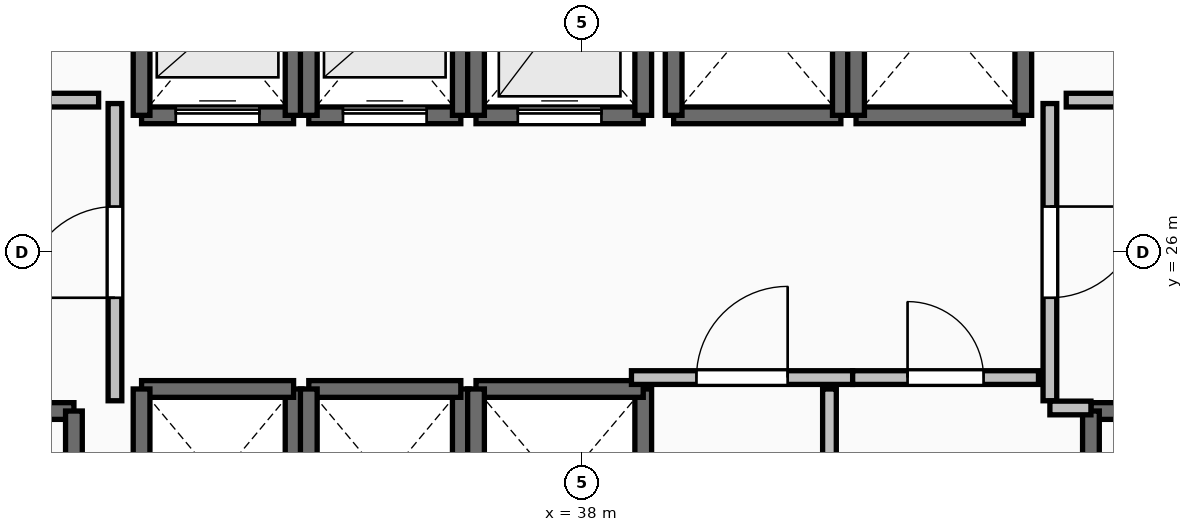
"""IFC4 building model, lengths in metres.
Left out: names, types, materials, properties, quantities, classifications, styles, units other than length and angle.
Written with IfcOpenShell. Run it as: python <this file> out.ifc"""

import sys

from ifc_helpers import new_model, si_unit, direction, frame, frame_2d, origin, place, context, subcontext, project, spatial, rectangle, extrude, element, fill, save


model = new_model("IFC4")
c1 = context("Model", 3, precision=1e-05, world=origin(), true_north=direction((0.0, 1.0)))
c2 = subcontext(c1, "Body", "Model", "MODEL_VIEW")
j1 = project(units=[si_unit("LENGTHUNIT", "METRE"), si_unit("PLANEANGLEUNIT", "RADIAN")], contexts=[c1])
p1 = place(None, origin())
s1 = spatial("IfcSite", under=j1, at=p1, CompositionType="ELEMENT")
p2 = place(p1, origin())
s2 = spatial("IfcBuilding", under=s1, at=p2, CompositionType="ELEMENT")
p3 = place(p2, frame((0.0, 0.0, 74.3)))
s3 = spatial("IfcBuildingStorey", under=s2, at=p3, CompositionType="ELEMENT", Elevation=74.3)
p4 = place(p3, frame((27.94, 23.91, 0.0), z_axis=(0.0, 0.0, 1.0), x_axis=(1.0, 0.0, 0.0)))
e1 = element("IfcWall", 1, at=p4, inside=s3, PredefinedType="SOLIDWALL", context=c2, shape_type="SweptSolid", body=[
    extrude(rectangle(XDim=3.37, YDim=0.22, at=frame_2d((1.685, 0.0))), origin(), (0.0, 0.0, 1.0), 4.24),
])
p5 = place(p4, frame((1.135, 0.0, 0.0)))
e2 = element("IfcOpeningElement", 2, at=p5, cuts=e1, PredefinedType="OPENING", context=c2, shape_type="SweptSolid", body=[
    extrude(rectangle(XDim=1.1, YDim=2.15, at=frame_2d((0.55, 1.075))), frame((0.0, 0.125, 0.0), z_axis=(0.0, -1.0, 0.0), x_axis=(1.0, 0.0, 0.0)), (0.0, 0.0, 1.0), 0.25),
])
p6 = place(p3, frame((31.31, 23.91, 0.0), z_axis=(0.0, 0.0, 1.0), x_axis=(0.0, -1.0, 0.0)))
e3 = element("IfcWall", 3, at=p6, inside=s3, PredefinedType="SOLIDWALL", context=c2, shape_type="SweptSolid", body=[
    extrude(rectangle(XDim=7.42, YDim=0.22, at=frame_2d((3.71, 0.0))), origin(), (0.0, 0.0, 1.0), 4.24),
])
p7 = place(p3, frame((44.69, 23.91, 0.0), z_axis=(0.0, 0.0, 1.0), x_axis=(1.0, 0.0, 0.0)))
e4 = element("IfcWall", 4, at=p7, inside=s3, PredefinedType="SOLIDWALL", context=c2, shape_type="SweptSolid", body=[
    extrude(rectangle(XDim=3.37, YDim=0.22, at=frame_2d((1.685, 0.0))), origin(), (0.0, 0.0, 1.0), 4.24),
])
p8 = place(p7, frame((1.135, 0.0, 0.0)))
e5 = element("IfcOpeningElement", 5, at=p8, cuts=e4, PredefinedType="OPENING", context=c2, shape_type="SweptSolid", body=[
    extrude(rectangle(XDim=1.1, YDim=2.15, at=frame_2d((0.55, 1.075))), frame((0.0, 0.125, 0.0), z_axis=(0.0, -1.0, 0.0), x_axis=(1.0, 0.0, 0.0)), (0.0, 0.0, 1.0), 0.25),
])
p9 = place(p3, frame((44.69, 16.49, 0.0), z_axis=(0.0, 0.0, 1.0), x_axis=(0.0, 1.0, 0.0)))
e6 = element("IfcWall", 6, at=p9, inside=s3, PredefinedType="SOLIDWALL", context=c2, shape_type="SweptSolid", body=[
    extrude(rectangle(XDim=7.42, YDim=0.22, at=frame_2d((3.71, 0.0))), origin(), (0.0, 0.0, 1.0), 4.24),
])
p10 = place(p3, frame((32.2, 27.8, 0.0), z_axis=(0.0, 0.0, 1.0), x_axis=(1.0, 0.0, 0.0)))
e7 = element("IfcWall", 7, at=p10, inside=s3, PredefinedType="SOLIDWALL", context=c2, shape_type="SweptSolid", body=[
    extrude(rectangle(XDim=2.0, YDim=0.22, at=frame_2d((1.0, 0.0))), origin(), (0.0, 0.0, 1.0), 4.24),
])
p11 = place(p10, frame((0.45, 0.0, 0.0)))
e8 = element("IfcOpeningElement", 8, at=p11, cuts=e7, PredefinedType="OPENING", context=c2, shape_type="SweptSolid", body=[
    extrude(rectangle(XDim=1.1, YDim=2.2, at=frame_2d((0.55, 1.1))), frame((0.0, 0.125, 0.0), z_axis=(0.0, -1.0, 0.0), x_axis=(1.0, 0.0, 0.0)), (0.0, 0.0, 1.0), 0.25),
])
for number, where, z_axis, x_axis in (
    (9, (34.2, 27.8, 0.0), (0.0, 0.0, 1.0), (0.0, 1.0, 0.0)),
    (10, (32.2, 30.2, 0.0), (0.0, 0.0, 1.0), (0.0, -1.0, 0.0)),
):
    element("IfcWall", number, at=place(p3, frame(where, z_axis=z_axis, x_axis=x_axis)), inside=s3, PredefinedType="SOLIDWALL", context=c2, shape_type="SweptSolid", body=[
        extrude(rectangle(XDim=2.4, YDim=0.22, at=frame_2d((1.2, 0.0))), origin(), (0.0, 0.0, 1.0), 4.24),
    ])
p12 = place(p3, frame((34.4, 27.8, 0.0), z_axis=(0.0, 0.0, 1.0), x_axis=(1.0, 0.0, 0.0)))
e11 = element("IfcWall", 11, at=p12, inside=s3, PredefinedType="SOLIDWALL", context=c2, shape_type="SweptSolid", body=[
    extrude(rectangle(XDim=2.0, YDim=0.22, at=frame_2d((1.0, 0.0))), origin(), (0.0, 0.0, 1.0), 4.24),
])
p13 = place(p12, frame((0.45, 0.0, 0.0)))
e12 = element("IfcOpeningElement", 12, at=p13, cuts=e11, PredefinedType="OPENING", context=c2, shape_type="SweptSolid", body=[
    extrude(rectangle(XDim=1.1, YDim=2.2, at=frame_2d((0.55, 1.1))), frame((0.0, 0.125, 0.0), z_axis=(0.0, -1.0, 0.0), x_axis=(1.0, 0.0, 0.0)), (0.0, 0.0, 1.0), 0.25),
])
for number, where, z_axis, x_axis in (
    (13, (36.4, 27.8, 0.0), (0.0, 0.0, 1.0), (0.0, 1.0, 0.0)),
    (14, (34.4, 30.2, 0.0), (0.0, 0.0, 1.0), (0.0, -1.0, 0.0)),
):
    element("IfcWall", number, at=place(p3, frame(where, z_axis=z_axis, x_axis=x_axis)), inside=s3, PredefinedType="SOLIDWALL", context=c2, shape_type="SweptSolid", body=[
        extrude(rectangle(XDim=2.4, YDim=0.22, at=frame_2d((1.2, 0.0))), origin(), (0.0, 0.0, 1.0), 4.24),
    ])
p14 = place(p3, frame((36.6, 27.8, 0.0), z_axis=(0.0, 0.0, 1.0), x_axis=(1.0, 0.0, 0.0)))
e15 = element("IfcWall", 15, at=p14, inside=s3, PredefinedType="SOLIDWALL", context=c2, shape_type="SweptSolid", body=[
    extrude(rectangle(XDim=2.2, YDim=0.22, at=frame_2d((1.1, 0.0))), origin(), (0.0, 0.0, 1.0), 4.24),
])
p15 = place(p14, frame((0.55, 0.0, 0.0)))
e16 = element("IfcOpeningElement", 16, at=p15, cuts=e15, PredefinedType="OPENING", context=c2, shape_type="SweptSolid", body=[
    extrude(rectangle(XDim=1.1, YDim=2.2, at=frame_2d((0.55, 1.1))), frame((0.0, 0.125, 0.0), z_axis=(0.0, -1.0, 0.0), x_axis=(1.0, 0.0, 0.0)), (0.0, 0.0, 1.0), 0.25),
])
for number, where, z_axis, x_axis in (
    (17, (38.8, 27.8, 0.0), (0.0, 0.0, 1.0), (0.0, 1.0, 0.0)),
    (18, (36.6, 30.4, 0.0), (0.0, 0.0, 1.0), (0.0, -1.0, 0.0)),
):
    element("IfcWall", number, at=place(p3, frame(where, z_axis=z_axis, x_axis=x_axis)), inside=s3, PredefinedType="SOLIDWALL", context=c2, shape_type="SweptSolid", body=[
        extrude(rectangle(XDim=2.6, YDim=0.22, at=frame_2d((1.3, 0.0))), origin(), (0.0, 0.0, 1.0), 4.24),
    ])
p16 = place(p3, frame((34.2, 21.8, 0.0), z_axis=(0.0, 0.0, 1.0), x_axis=(0.0, 1.0, 0.0)))
e19 = element("IfcWall", 19, at=p16, inside=s3, PredefinedType="SOLIDWALL", context=c2, shape_type="SweptSolid", body=[
    extrude(rectangle(XDim=2.4, YDim=0.22, at=frame_2d((1.2, 0.0))), origin(), (0.0, 0.0, 1.0), 4.24),
])
p17 = place(p3, frame((34.2, 24.2, 0.0), z_axis=(0.0, 0.0, 1.0), x_axis=(-1.0, 0.0, 0.0)))
e20 = element("IfcWall", 20, at=p17, inside=s3, PredefinedType="SOLIDWALL", context=c2, shape_type="SweptSolid", body=[
    extrude(rectangle(XDim=2.0, YDim=0.22, at=frame_2d((1.0, 0.0))), origin(), (0.0, 0.0, 1.0), 4.24),
])
for number, where, z_axis, x_axis in (
    (21, (32.2, 24.2, 0.0), (0.0, 0.0, 1.0), (0.0, -1.0, 0.0)),
    (22, (36.4, 21.8, 0.0), (0.0, 0.0, 1.0), (0.0, 1.0, 0.0)),
):
    element("IfcWall", number, at=place(p3, frame(where, z_axis=z_axis, x_axis=x_axis)), inside=s3, PredefinedType="SOLIDWALL", context=c2, shape_type="SweptSolid", body=[
        extrude(rectangle(XDim=2.4, YDim=0.22, at=frame_2d((1.2, 0.0))), origin(), (0.0, 0.0, 1.0), 4.24),
    ])
p18 = place(p3, frame((36.4, 24.2, 0.0), z_axis=(0.0, 0.0, 1.0), x_axis=(-1.0, 0.0, 0.0)))
e23 = element("IfcWall", 23, at=p18, inside=s3, PredefinedType="SOLIDWALL", context=c2, shape_type="SweptSolid", body=[
    extrude(rectangle(XDim=2.0, YDim=0.22, at=frame_2d((1.0, 0.0))), origin(), (0.0, 0.0, 1.0), 4.24),
])
p19 = place(p3, frame((34.4, 24.2, 0.0), z_axis=(0.0, 0.0, 1.0), x_axis=(0.0, -1.0, 0.0)))
e24 = element("IfcWall", 24, at=p19, inside=s3, PredefinedType="SOLIDWALL", context=c2, shape_type="SweptSolid", body=[
    extrude(rectangle(XDim=2.4, YDim=0.22, at=frame_2d((1.2, 0.0))), origin(), (0.0, 0.0, 1.0), 4.24),
])
p20 = place(p3, frame((38.8, 21.6, 0.0), z_axis=(0.0, 0.0, 1.0), x_axis=(0.0, 1.0, 0.0)))
e25 = element("IfcWall", 25, at=p20, inside=s3, PredefinedType="SOLIDWALL", context=c2, shape_type="SweptSolid", body=[
    extrude(rectangle(XDim=2.6, YDim=0.22, at=frame_2d((1.3, 0.0))), origin(), (0.0, 0.0, 1.0), 4.24),
])
p21 = place(p3, frame((38.8, 24.2, 0.0), z_axis=(0.0, 0.0, 1.0), x_axis=(-1.0, 0.0, 0.0)))
e26 = element("IfcWall", 26, at=p21, inside=s3, PredefinedType="SOLIDWALL", context=c2, shape_type="SweptSolid", body=[
    extrude(rectangle(XDim=2.2, YDim=0.22, at=frame_2d((1.1, 0.0))), origin(), (0.0, 0.0, 1.0), 4.24),
])
p22 = place(p3, frame((36.6, 24.2, 0.0), z_axis=(0.0, 0.0, 1.0), x_axis=(0.0, -1.0, 0.0)))
e27 = element("IfcWall", 27, at=p22, inside=s3, PredefinedType="SOLIDWALL", context=c2, shape_type="SweptSolid", body=[
    extrude(rectangle(XDim=2.6, YDim=0.22, at=frame_2d((1.3, 0.0))), origin(), (0.0, 0.0, 1.0), 4.24),
])
p23 = place(p3, frame((39.2, 27.8, 0.0), z_axis=(0.0, 0.0, 1.0), x_axis=(1.0, 0.0, 0.0)))
e28 = element("IfcWall", 28, at=p23, inside=s3, PredefinedType="SOLIDWALL", context=c2, shape_type="SweptSolid", body=[
    extrude(rectangle(XDim=2.2, YDim=0.22, at=frame_2d((1.1, 0.0))), origin(), (0.0, 0.0, 1.0), 4.24),
])
for number, where, z_axis, x_axis in (
    (29, (41.4, 27.8, 0.0), (0.0, 0.0, 1.0), (0.0, 1.0, 0.0)),
    (30, (39.2, 30.4, 0.0), (0.0, 0.0, 1.0), (0.0, -1.0, 0.0)),
):
    element("IfcWall", number, at=place(p3, frame(where, z_axis=z_axis, x_axis=x_axis)), inside=s3, PredefinedType="SOLIDWALL", context=c2, shape_type="SweptSolid", body=[
        extrude(rectangle(XDim=2.6, YDim=0.22, at=frame_2d((1.3, 0.0))), origin(), (0.0, 0.0, 1.0), 4.24),
    ])
p24 = place(p3, frame((41.6, 27.8, 0.0), z_axis=(0.0, 0.0, 1.0), x_axis=(1.0, 0.0, 0.0)))
e31 = element("IfcWall", 31, at=p24, inside=s3, PredefinedType="SOLIDWALL", context=c2, shape_type="SweptSolid", body=[
    extrude(rectangle(XDim=2.2, YDim=0.22, at=frame_2d((1.1, 0.0))), origin(), (0.0, 0.0, 1.0), 4.24),
])
for number, where, z_axis, x_axis in (
    (32, (43.8, 27.8, 0.0), (0.0, 0.0, 1.0), (0.0, 1.0, 0.0)),
    (33, (41.6, 30.4, 0.0), (0.0, 0.0, 1.0), (0.0, -1.0, 0.0)),
):
    element("IfcWall", number, at=place(p3, frame(where, z_axis=z_axis, x_axis=x_axis)), inside=s3, PredefinedType="SOLIDWALL", context=c2, shape_type="SweptSolid", body=[
        extrude(rectangle(XDim=2.6, YDim=0.22, at=frame_2d((1.3, 0.0))), origin(), (0.0, 0.0, 1.0), 4.24),
    ])
p25 = place(p3, frame((31.85, 24.045, 0.0), z_axis=(0.0, 0.0, 1.0), x_axis=(0.0, 1.0, 0.0)))
e34 = element("IfcWall", 34, at=p25, inside=s3, PredefinedType="PARTITIONING", context=c2, shape_type="SweptSolid", body=[
    extrude(rectangle(XDim=3.91, YDim=0.18, at=frame_2d((1.955, 0.0))), origin(), (0.0, 0.0, 1.0), 4.24),
])
p26 = place(p25, frame((1.355, 0.0, 0.0)))
e35 = element("IfcOpeningElement", 35, at=p26, cuts=e34, PredefinedType="OPENING", context=c2, shape_type="SweptSolid", body=[
    extrude(rectangle(XDim=1.2, YDim=2.15, at=frame_2d((0.6, 1.075))), frame((0.0, 0.105, 0.0), z_axis=(0.0, -1.0, 0.0), x_axis=(1.0, 0.0, 0.0)), (0.0, 0.0, 1.0), 0.21),
])
p27 = place(p3, frame((44.15, 27.955, 0.0), z_axis=(0.0, 0.0, 1.0), x_axis=(0.0, -1.0, 0.0)))
e36 = element("IfcWall", 36, at=p27, inside=s3, PredefinedType="PARTITIONING", context=c2, shape_type="SweptSolid", body=[
    extrude(rectangle(XDim=3.91, YDim=0.18, at=frame_2d((1.955, 0.0))), origin(), (0.0, 0.0, 1.0), 4.24),
])
p28 = place(p27, frame((1.355, 0.0, 0.0)))
e37 = element("IfcOpeningElement", 37, at=p28, cuts=e36, PredefinedType="OPENING", context=c2, shape_type="SweptSolid", body=[
    extrude(rectangle(XDim=1.2, YDim=2.15, at=frame_2d((0.6, 1.075))), frame((0.0, 0.105, 0.0), z_axis=(0.0, -1.0, 0.0), x_axis=(1.0, 0.0, 0.0)), (0.0, 0.0, 1.0), 0.21),
])
p29 = place(p3, frame((44.15, 23.95, 0.0), z_axis=(0.0, 0.0, 1.0), x_axis=(1.0, 0.0, 0.0)))
e38 = element("IfcWall", 38, at=p29, inside=s3, PredefinedType="PARTITIONING", context=c2, shape_type="SweptSolid", body=[
    extrude(rectangle(XDim=0.54, YDim=0.18, at=frame_2d((0.27, 0.0))), origin(), (0.0, 0.0, 1.0), 4.24),
])
p30 = place(p3, frame((38.645, 24.35, 0.0), z_axis=(0.0, 0.0, 1.0), x_axis=(1.0, 0.0, 0.0)))
e39 = element("IfcWall", 39, at=p30, inside=s3, PredefinedType="PARTITIONING", context=c2, shape_type="SweptSolid", body=[
    extrude(rectangle(XDim=2.91, YDim=0.18, at=frame_2d((1.455, 0.0))), origin(), (0.0, 0.0, 1.0), 4.24),
])
p31 = place(p30, frame((0.855, 0.0, 0.0)))
e40 = element("IfcOpeningElement", 40, at=p31, cuts=e39, PredefinedType="OPENING", context=c2, shape_type="SweptSolid", body=[
    extrude(rectangle(XDim=1.2, YDim=2.15, at=frame_2d((0.6, 1.075))), frame((0.0, 0.105, 0.0), z_axis=(0.0, -1.0, 0.0), x_axis=(1.0, 0.0, 0.0)), (0.0, 0.0, 1.0), 0.21),
])
p32 = place(p3, frame((41.555, 24.35, 0.0), z_axis=(0.0, 0.0, 1.0), x_axis=(1.0, 0.0, 0.0)))
e41 = element("IfcWall", 41, at=p32, inside=s3, PredefinedType="PARTITIONING", context=c2, shape_type="SweptSolid", body=[
    extrude(rectangle(XDim=2.445, YDim=0.18, at=frame_2d((1.223, 0.0))), origin(), (0.0, 0.0, 1.0), 4.24),
])
p33 = place(p32, frame((0.722, 0.0, 0.0)))
e42 = element("IfcOpeningElement", 42, at=p33, cuts=e41, PredefinedType="OPENING", context=c2, shape_type="SweptSolid", body=[
    extrude(rectangle(XDim=1.0, YDim=2.15, at=frame_2d((0.5, 1.075))), frame((0.0, 0.105, 0.0), z_axis=(0.0, -1.0, 0.0), x_axis=(1.0, 0.0, 0.0)), (0.0, 0.0, 1.0), 0.21),
])
p34 = place(p3, frame((41.25, 20.305, 0.0), z_axis=(0.0, 0.0, 1.0), x_axis=(0.0, 1.0, 0.0)))
e43 = element("IfcWall", 43, at=p34, inside=s3, PredefinedType="PARTITIONING", context=c2, shape_type="SweptSolid", body=[
    extrude(rectangle(XDim=3.895, YDim=0.18, at=frame_2d((1.948, 0.0))), origin(), (0.0, 0.0, 1.0), 4.24),
])
p35 = place(p34, frame((1.448, 0.0, 0.0)))
e44 = element("IfcOpeningElement", 44, at=p35, cuts=e43, PredefinedType="OPENING", context=c2, shape_type="SweptSolid", body=[
    extrude(rectangle(XDim=1.0, YDim=2.15, at=frame_2d((0.5, 1.075))), frame((0.0, 0.105, 0.0), z_axis=(0.0, -1.0, 0.0), x_axis=(1.0, 0.0, 0.0)), (0.0, 0.0, 1.0), 0.21),
])
for number, where, z_axis, x_axis in (
    (45, (31.635, 28.0, 0.0), (0.0, 0.0, 1.0), (-1.0, 0.0, 0.0)),
    (46, (45.28, 28.0, 0.0), (0.0, 0.0, 1.0), (-1.0, 0.0, 0.0)),
):
    element("IfcWall", number, at=place(p3, frame(where, z_axis=z_axis, x_axis=x_axis)), inside=s3, PredefinedType="PARTITIONING", context=c2, shape_type="SweptSolid", body=[
        extrude(rectangle(XDim=0.915, YDim=0.18, at=frame_2d((0.458, 0.0))), origin(), (0.0, 0.0, 1.0), 4.24),
    ])
p36 = place(p11, origin())
e47 = element("IfcDoor", 47, at=p36, inside=s3, OperationType="SLIDING_TO_LEFT", PredefinedType="DOOR", context=c2, shape_type="SweptSolid", body=[
    extrude(rectangle(XDim=1.1, YDim=2.2, at=frame_2d((0.55, 1.1))), frame((0.0, 0.025, 0.0), z_axis=(0.0, -1.0, 0.0), x_axis=(1.0, 0.0, 0.0)), (0.0, 0.0, 1.0), 0.05),
])
fill(e8, e47)
p37 = place(p13, origin())
e48 = element("IfcDoor", 48, at=p37, inside=s3, OperationType="SLIDING_TO_LEFT", PredefinedType="DOOR", context=c2, shape_type="SweptSolid", body=[
    extrude(rectangle(XDim=1.1, YDim=2.2, at=frame_2d((0.55, 1.1))), frame((0.0, 0.025, 0.0), z_axis=(0.0, -1.0, 0.0), x_axis=(1.0, 0.0, 0.0)), (0.0, 0.0, 1.0), 0.05),
])
fill(e12, e48)
p38 = place(p15, origin())
e49 = element("IfcDoor", 49, at=p38, inside=s3, OperationType="SLIDING_TO_LEFT", PredefinedType="DOOR", context=c2, shape_type="SweptSolid", body=[
    extrude(rectangle(XDim=1.1, YDim=2.2, at=frame_2d((0.55, 1.1))), frame((0.0, 0.025, 0.0), z_axis=(0.0, -1.0, 0.0), x_axis=(1.0, 0.0, 0.0)), (0.0, 0.0, 1.0), 0.05),
])
fill(e16, e49)
p39 = place(p26, origin())
e50 = element("IfcDoor", 50, at=p39, inside=s3, OperationType="SINGLE_SWING_LEFT", PredefinedType="DOOR", context=c2, shape_type="SweptSolid", body=[
    extrude(rectangle(XDim=1.2, YDim=2.15, at=frame_2d((0.6, 1.075))), frame((0.0, 0.025, 0.0), z_axis=(0.0, -1.0, 0.0), x_axis=(1.0, 0.0, 0.0)), (0.0, 0.0, 1.0), 0.05),
])
fill(e35, e50)
p40 = place(p28, origin())
e51 = element("IfcDoor", 51, at=p40, inside=s3, OperationType="SINGLE_SWING_LEFT", PredefinedType="DOOR", context=c2, shape_type="SweptSolid", body=[
    extrude(rectangle(XDim=1.2, YDim=2.15, at=frame_2d((0.6, 1.075))), frame((0.0, 0.025, 0.0), z_axis=(0.0, -1.0, 0.0), x_axis=(1.0, 0.0, 0.0)), (0.0, 0.0, 1.0), 0.05),
])
fill(e37, e51)
p41 = place(p31, origin())
e52 = element("IfcDoor", 52, at=p41, inside=s3, OperationType="SINGLE_SWING_RIGHT", PredefinedType="DOOR", context=c2, shape_type="SweptSolid", body=[
    extrude(rectangle(XDim=1.2, YDim=2.15, at=frame_2d((0.6, 1.075))), frame((0.0, 0.025, 0.0), z_axis=(0.0, -1.0, 0.0), x_axis=(1.0, 0.0, 0.0)), (0.0, 0.0, 1.0), 0.05),
])
fill(e40, e52)
p42 = place(p33, origin())
e53 = element("IfcDoor", 53, at=p42, inside=s3, OperationType="SINGLE_SWING_LEFT", PredefinedType="DOOR", context=c2, shape_type="SweptSolid", body=[
    extrude(rectangle(XDim=1.0, YDim=2.15, at=frame_2d((0.5, 1.075))), frame((0.0, 0.025, 0.0), z_axis=(0.0, -1.0, 0.0), x_axis=(1.0, 0.0, 0.0)), (0.0, 0.0, 1.0), 0.05),
])
fill(e42, e53)
save(model, sys.argv[1])
